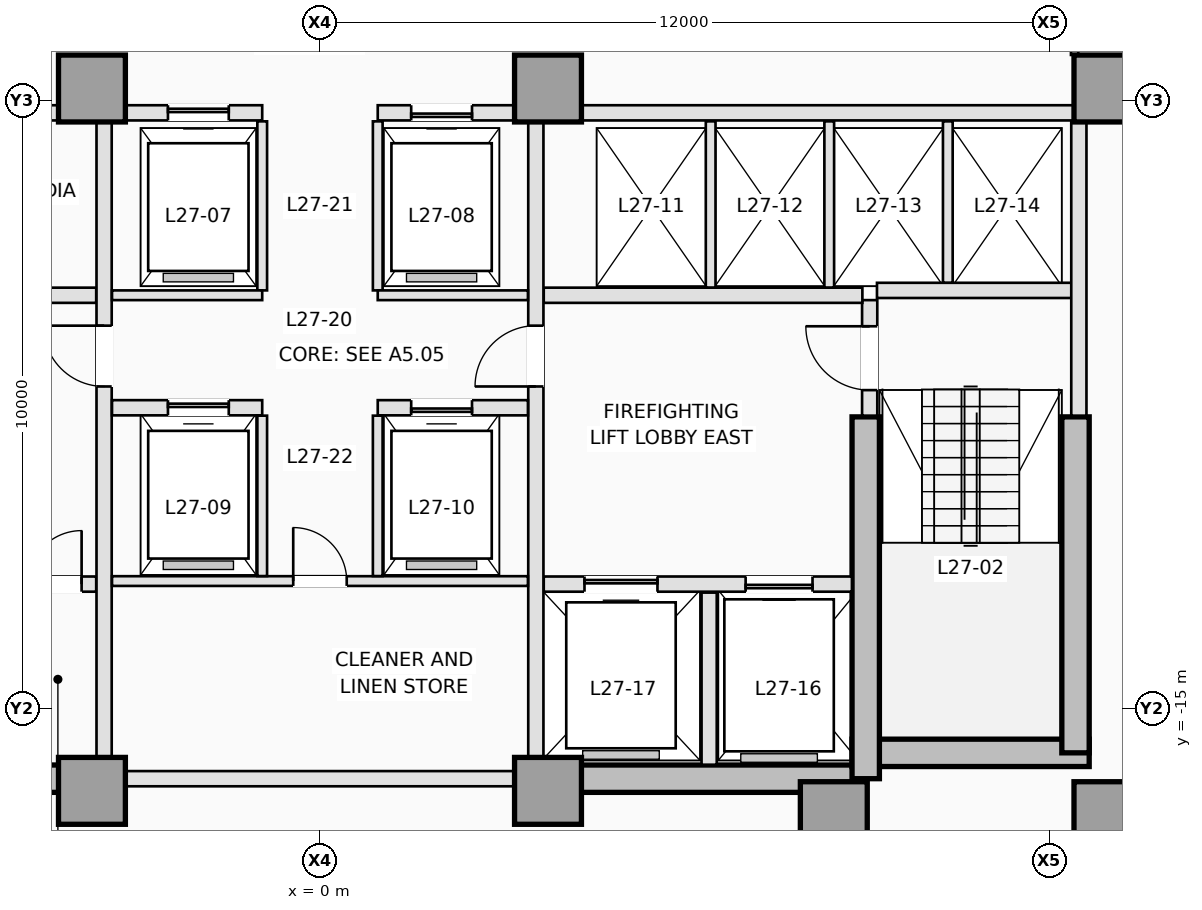
"""IFC4 building model, lengths in metres.
Left out: names, types, materials, properties, quantities, classifications, styles, units other than length and angle.
Written with IfcOpenShell. Run it as: python <this file> out.ifc"""

import sys

from ifc_helpers import new_model, si_unit, direction, frame, frame_2d, origin, origin_2d, place, context, subcontext, project, spatial, rectangle, extrude, element, fill, save


model = new_model("IFC4")
c1 = context("Model", 3, precision=1e-05, world=origin(), true_north=direction((0.0, 1.0)))
c2 = subcontext(c1, "Body", "Model", "MODEL_VIEW")
j1 = project(units=[si_unit("LENGTHUNIT", "METRE"), si_unit("PLANEANGLEUNIT", "RADIAN")], contexts=[c1])
p1 = place(None, origin())
s1 = spatial("IfcSite", under=j1, at=p1, CompositionType="ELEMENT")
p2 = place(p1, origin())
s2 = spatial("IfcBuilding", under=s1, at=p2, CompositionType="ELEMENT")
p3 = place(p2, frame((0.0, 0.0, 102.0)))
s3 = spatial("IfcBuildingStorey", under=s2, at=p3, CompositionType="ELEMENT", Elevation=102.0)
for number, where, z_axis, x_axis in (
    (1, (-8.975, -16.15, 0.0), (0.0, 0.0, 1.0), (1.0, 0.0, 0.0)),
    (2, (3.75, -16.15, 0.0), (0.0, 0.0, 1.0), (1.0, 0.0, 0.0)),
):
    element("IfcWall", number, at=place(p3, frame(where, z_axis=z_axis, x_axis=x_axis)), inside=s3, PredefinedType="SHEAR", context=c2, shape_type="SweptSolid", body=[
        extrude(rectangle(XDim=5.225, YDim=0.45, at=frame_2d((2.613, 0.0))), origin(), (0.0, 0.0, 1.0), 3.5),
    ])
p4 = place(p3, frame((8.75, -15.725, 0.0), z_axis=(0.0, 0.0, 1.0), x_axis=(1.0, 0.0, 0.0)))
e3 = element("IfcWall", 3, at=p4, inside=s3, PredefinedType="SHEAR", context=c2, shape_type="SweptSolid", body=[
    extrude(rectangle(XDim=3.9, YDim=0.45, at=frame_2d((1.95, 0.0))), origin(), (0.0, 0.0, 1.0), 3.5),
])
p5 = place(p3, frame((12.425, -15.725, 0.0), z_axis=(0.0, 0.0, 1.0), x_axis=(0.0, 1.0, 0.0)))
e4 = element("IfcWall", 4, at=p5, inside=s3, PredefinedType="SHEAR", context=c2, shape_type="SweptSolid", body=[
    extrude(rectangle(XDim=5.525, YDim=0.45, at=frame_2d((2.763, 0.0))), origin(), (0.0, 0.0, 1.0), 3.5),
])
p6 = place(p3, frame((8.975, -16.15, 0.0), z_axis=(0.0, 0.0, 1.0), x_axis=(0.0, 1.0, 0.0)))
e5 = element("IfcWall", 5, at=p6, inside=s3, PredefinedType="SHEAR", context=c2, shape_type="SweptSolid", body=[
    extrude(rectangle(XDim=5.95, YDim=0.45, at=frame_2d((2.975, 0.0))), origin(), (0.0, 0.0, 1.0), 3.5),
])
for number, where, z_axis, x_axis in (
    (6, (-3.75, -16.35, 0.0), (0.0, 0.0, 1.0), (1.0, 0.0, 0.0)),
    (7, (3.75, -16.35, 0.0), (0.0, 0.0, 1.0), (1.0, 0.0, 0.0)),
    (8, (8.45, -16.75, 0.0), (0.0, 0.0, 1.0), (1.0, 0.0, 0.0)),
    (9, (12.95, -16.75, 0.0), (0.0, 0.0, 1.0), (1.0, 0.0, 0.0)),
    (10, (-3.75, -4.8, 0.0), (0.0, 0.0, 1.0), (1.0, 0.0, 0.0)),
    (11, (3.75, -4.8, 0.0), (0.0, 0.0, 1.0), (1.0, 0.0, 0.0)),
    (12, (12.95, -4.8, 0.0), (0.0, 0.0, 1.0), (1.0, 0.0, 0.0)),
):
    element("IfcColumn", number, at=place(p3, frame(where, z_axis=z_axis, x_axis=x_axis)), inside=s3, PredefinedType="COLUMN", context=c2, shape_type="SweptSolid", body=[
        extrude(rectangle(XDim=1.1, YDim=1.1, at=origin_2d()), origin(), (0.0, 0.0, 1.0), 3.5),
    ])
p7 = place(p3, frame((9.04, -10.18, 0.0), z_axis=(0.0, 0.0, 1.0), x_axis=(0.0, 1.0, 0.0)))
e13 = element("IfcWall", 13, at=p7, inside=s3, PredefinedType="PARTITIONING", context=c2, shape_type="SweptSolid", body=[
    extrude(rectangle(XDim=1.9, YDim=0.25, at=frame_2d((0.95, 0.0))), origin(), (0.0, 0.0, 1.0), 3.25),
])
p8 = place(p7, frame((0.42, 0.0, 0.0)))
e14 = element("IfcOpeningElement", 14, at=p8, cuts=e13, PredefinedType="OPENING", context=c2, shape_type="SweptSolid", body=[
    extrude(rectangle(XDim=1.05, YDim=2.15, at=frame_2d((0.525, 1.075))), frame((0.0, 0.135, 0.0), z_axis=(0.0, -1.0, 0.0), x_axis=(1.0, 0.0, 0.0)), (0.0, 0.0, 1.0), 0.27),
])
p9 = place(p3, frame((9.16, -8.12, 0.0), z_axis=(0.0, 0.0, 1.0), x_axis=(1.0, 0.0, 0.0)))
e15 = element("IfcWall", 15, at=p9, inside=s3, PredefinedType="PARTITIONING", context=c2, shape_type="SweptSolid", body=[
    extrude(rectangle(XDim=3.22, YDim=0.25, at=frame_2d((1.61, 0.0))), origin(), (0.0, 0.0, 1.0), 3.25),
])
p10 = place(p3, frame((12.48, -10.18, 0.0), z_axis=(0.0, 0.0, 1.0), x_axis=(0.0, 1.0, 0.0)))
e16 = element("IfcWall", 16, at=p10, inside=s3, PredefinedType="PARTITIONING", context=c2, shape_type="SweptSolid", body=[
    extrude(rectangle(XDim=4.828, YDim=0.25, at=frame_2d((2.414, 0.0))), origin(), (0.0, 0.0, 1.0), 3.25),
])
p11 = place(p3, frame((-8.748, -12.95, 0.0), z_axis=(0.0, 0.0, 1.0), x_axis=(1.0, 0.0, 0.0)))
e17 = element("IfcWall", 17, at=p11, inside=s3, PredefinedType="PARTITIONING", context=c2, shape_type="SweptSolid", body=[
    extrude(rectangle(XDim=5.068, YDim=0.25, at=frame_2d((2.534, 0.0))), origin(), (0.0, 0.0, 1.0), 3.25),
])
p12 = place(p11, frame((0.648, 0.0, 0.0)))
e18 = element("IfcOpeningElement", 18, at=p12, cuts=e17, PredefinedType="OPENING", context=c2, shape_type="SweptSolid", body=[
    extrude(rectangle(XDim=1.1, YDim=2.15, at=frame_2d((0.55, 1.075))), frame((0.0, 0.135, 0.0), z_axis=(0.0, -1.0, 0.0), x_axis=(1.0, 0.0, 0.0)), (0.0, 0.0, 1.0), 0.27),
])
p13 = place(p11, frame((2.548, 0.0, 0.0)))
e19 = element("IfcOpeningElement", 19, at=p13, cuts=e17, PredefinedType="OPENING", context=c2, shape_type="SweptSolid", body=[
    extrude(rectangle(XDim=0.88, YDim=2.1, at=frame_2d((0.44, 1.05))), frame((0.0, 0.135, 0.0), z_axis=(0.0, -1.0, 0.0), x_axis=(1.0, 0.0, 0.0)), (0.0, 0.0, 1.0), 0.27),
])
p14 = place(p11, frame((3.948, 0.0, 0.0)))
e20 = element("IfcOpeningElement", 20, at=p14, cuts=e17, PredefinedType="OPENING", context=c2, shape_type="SweptSolid", body=[
    extrude(rectangle(XDim=0.88, YDim=2.1, at=frame_2d((0.44, 1.05))), frame((0.0, 0.135, 0.0), z_axis=(0.0, -1.0, 0.0), x_axis=(1.0, 0.0, 0.0)), (0.0, 0.0, 1.0), 0.27),
])
p15 = place(p3, frame((3.68, -12.95, 0.0), z_axis=(0.0, 0.0, 1.0), x_axis=(1.0, 0.0, 0.0)))
e21 = element("IfcWall", 21, at=p15, inside=s3, PredefinedType="PARTITIONING", context=c2, shape_type="SweptSolid", body=[
    extrude(rectangle(XDim=5.068, YDim=0.25, at=frame_2d((2.534, 0.0))), origin(), (0.0, 0.0, 1.0), 3.25),
])
p16 = place(p15, frame((3.32, 0.0, 0.0)))
e22 = element("IfcOpeningElement", 22, at=p16, cuts=e21, PredefinedType="OPENING", context=c2, shape_type="SweptSolid", body=[
    extrude(rectangle(XDim=1.1, YDim=2.15, at=frame_2d((0.55, 1.075))), frame((0.0, 0.135, 0.0), z_axis=(0.0, -1.0, 0.0), x_axis=(1.0, 0.0, 0.0)), (0.0, 0.0, 1.0), 0.27),
])
p17 = place(p15, frame((0.67, 0.0, 0.0)))
e23 = element("IfcOpeningElement", 23, at=p17, cuts=e21, PredefinedType="OPENING", context=c2, shape_type="SweptSolid", body=[
    extrude(rectangle(XDim=1.2, YDim=2.15, at=frame_2d((0.6, 1.075))), frame((0.0, 0.135, 0.0), z_axis=(0.0, -1.0, 0.0), x_axis=(1.0, 0.0, 0.0)), (0.0, 0.0, 1.0), 0.27),
])
p18 = place(p3, frame((6.4, -15.92, 0.0), z_axis=(0.0, 0.0, 1.0), x_axis=(0.0, 1.0, 0.0)))
e24 = element("IfcWall", 24, at=p18, inside=s3, PredefinedType="PARTITIONING", context=c2, shape_type="SweptSolid", body=[
    extrude(rectangle(XDim=2.83, YDim=0.25, at=frame_2d((1.415, 0.0))), origin(), (0.0, 0.0, 1.0), 3.25),
])
for number, where, z_axis, x_axis in (
    (25, (-8.92, -8.2, 0.0), (0.0, 0.0, 1.0), (1.0, 0.0, 0.0)),
    (26, (3.68, -8.2, 0.0), (0.0, 0.0, 1.0), (1.0, 0.0, 0.0)),
):
    element("IfcWall", number, at=place(p3, frame(where, z_axis=z_axis, x_axis=x_axis)), inside=s3, PredefinedType="PARTITIONING", context=c2, shape_type="SweptSolid", body=[
        extrude(rectangle(XDim=5.24, YDim=0.25, at=frame_2d((2.62, 0.0))), origin(), (0.0, 0.0, 1.0), 3.25),
    ])
p19 = place(p3, frame((-3.55, -15.798, 0.0), z_axis=(0.0, 0.0, 1.0), x_axis=(0.0, 1.0, 0.0)))
e27 = element("IfcWall", 27, at=p19, inside=s3, PredefinedType="PARTITIONING", context=c2, shape_type="SweptSolid", body=[
    extrude(rectangle(XDim=10.446, YDim=0.25, at=frame_2d((5.223, 0.0))), origin(), (0.0, 0.0, 1.0), 3.25),
])
p20 = place(p19, frame((6.098, 0.0, 0.0)))
e28 = element("IfcOpeningElement", 28, at=p20, cuts=e27, PredefinedType="OPENING", context=c2, shape_type="SweptSolid", body=[
    extrude(rectangle(XDim=1.0, YDim=2.15, at=frame_2d((0.5, 1.075))), frame((0.0, 0.135, 0.0), z_axis=(0.0, -1.0, 0.0), x_axis=(1.0, 0.0, 0.0)), (0.0, 0.0, 1.0), 0.27),
])
p21 = place(p3, frame((3.55, -15.798, 0.0), z_axis=(0.0, 0.0, 1.0), x_axis=(0.0, 1.0, 0.0)))
e29 = element("IfcWall", 29, at=p21, inside=s3, PredefinedType="PARTITIONING", context=c2, shape_type="SweptSolid", body=[
    extrude(rectangle(XDim=10.446, YDim=0.25, at=frame_2d((5.223, 0.0))), origin(), (0.0, 0.0, 1.0), 3.25),
])
p22 = place(p21, frame((6.098, 0.0, 0.0)))
e30 = element("IfcOpeningElement", 30, at=p22, cuts=e29, PredefinedType="OPENING", context=c2, shape_type="SweptSolid", body=[
    extrude(rectangle(XDim=1.0, YDim=2.15, at=frame_2d((0.5, 1.075))), frame((0.0, 0.135, 0.0), z_axis=(0.0, -1.0, 0.0), x_axis=(1.0, 0.0, 0.0)), (0.0, 0.0, 1.0), 0.27),
])
p23 = place(p3, frame((-12.398, -5.2, 0.0), z_axis=(0.0, 0.0, 1.0), x_axis=(1.0, 0.0, 0.0)))
e31 = element("IfcWall", 31, at=p23, inside=s3, PredefinedType="PARTITIONING", context=c2, shape_type="SweptSolid", body=[
    extrude(rectangle(XDim=8.096, YDim=0.25, at=frame_2d((4.048, 0.0))), origin(), (0.0, 0.0, 1.0), 3.25),
])
p24 = place(p23, frame((2.968, 0.0, 0.0)))
e32 = element("IfcOpeningElement", 32, at=p24, cuts=e31, PredefinedType="OPENING", context=c2, shape_type="SweptSolid", body=[
    extrude(rectangle(XDim=0.92, YDim=2.12, at=frame_2d((0.46, 1.06))), frame((0.0, 0.135, 0.0), z_axis=(0.0, -1.0, 0.0), x_axis=(1.0, 0.0, 0.0)), (0.0, 0.0, 1.0), 0.27),
])
p25 = place(p23, frame((6.068, 0.0, 0.0)))
e33 = element("IfcOpeningElement", 33, at=p25, cuts=e31, PredefinedType="OPENING", context=c2, shape_type="SweptSolid", body=[
    extrude(rectangle(XDim=0.92, YDim=2.12, at=frame_2d((0.46, 1.06))), frame((0.0, 0.135, 0.0), z_axis=(0.0, -1.0, 0.0), x_axis=(1.0, 0.0, 0.0)), (0.0, 0.0, 1.0), 0.27),
])
p26 = place(p3, frame((4.302, -5.2, 0.0), z_axis=(0.0, 0.0, 1.0), x_axis=(1.0, 0.0, 0.0)))
e34 = element("IfcWall", 34, at=p26, inside=s3, PredefinedType="PARTITIONING", context=c2, shape_type="SweptSolid", body=[
    extrude(rectangle(XDim=8.096, YDim=0.25, at=frame_2d((4.048, 0.0))), origin(), (0.0, 0.0, 1.0), 3.25),
])
p27 = place(p3, frame((-3.198, -5.2, 0.0), z_axis=(0.0, 0.0, 1.0), x_axis=(1.0, 0.0, 0.0)))
e35 = element("IfcWall", 35, at=p27, inside=s3, PredefinedType="PARTITIONING", context=c2, shape_type="SweptSolid", body=[
    extrude(rectangle(XDim=2.248, YDim=0.25, at=frame_2d((1.124, 0.0))), origin(), (0.0, 0.0, 1.0), 3.25),
])
p28 = place(p27, frame((0.698, 0.0, 0.0)))
e36 = element("IfcOpeningElement", 36, at=p28, cuts=e35, PredefinedType="OPENING", context=c2, shape_type="SweptSolid", body=[
    extrude(rectangle(XDim=1.0, YDim=2.15, at=frame_2d((0.5, 1.075))), frame((0.0, 0.135, 0.0), z_axis=(0.0, -1.0, 0.0), x_axis=(1.0, 0.0, 0.0)), (0.0, 0.0, 1.0), 0.27),
])
p29 = place(p3, frame((0.95, -5.2, 0.0), z_axis=(0.0, 0.0, 1.0), x_axis=(1.0, 0.0, 0.0)))
e37 = element("IfcWall", 37, at=p29, inside=s3, PredefinedType="PARTITIONING", context=c2, shape_type="SweptSolid", body=[
    extrude(rectangle(XDim=2.248, YDim=0.25, at=frame_2d((1.124, 0.0))), origin(), (0.0, 0.0, 1.0), 3.25),
])
p30 = place(p29, frame((0.55, 0.0, 0.0)))
e38 = element("IfcOpeningElement", 38, at=p30, cuts=e37, PredefinedType="OPENING", context=c2, shape_type="SweptSolid", body=[
    extrude(rectangle(XDim=1.0, YDim=2.15, at=frame_2d((0.5, 1.075))), frame((0.0, 0.135, 0.0), z_axis=(0.0, -1.0, 0.0), x_axis=(1.0, 0.0, 0.0)), (0.0, 0.0, 1.0), 0.27),
])
for number, where, z_axis, x_axis in (
    (39, (6.425, -8.073, 0.0), (0.0, 0.0, 1.0), (0.0, 1.0, 0.0)),
    (40, (8.375, -8.073, 0.0), (0.0, 0.0, 1.0), (0.0, 1.0, 0.0)),
):
    element("IfcWall", number, at=place(p3, frame(where, z_axis=z_axis, x_axis=x_axis)), inside=s3, PredefinedType="PARTITIONING", context=c2, shape_type="SweptSolid", body=[
        extrude(rectangle(XDim=2.733, YDim=0.16, at=frame_2d((1.366, 0.0))), origin(), (0.0, 0.0, 1.0), 3.25),
    ])
p31 = place(p3, frame((10.325, -7.993, 0.0), z_axis=(0.0, 0.0, 1.0), x_axis=(0.0, 1.0, 0.0)))
e41 = element("IfcWall", 41, at=p31, inside=s3, PredefinedType="PARTITIONING", context=c2, shape_type="SweptSolid", body=[
    extrude(rectangle(XDim=2.653, YDim=0.16, at=frame_2d((1.326, 0.0))), origin(), (0.0, 0.0, 1.0), 3.25),
])
p32 = place(p3, frame((-3.198, -16.15, 0.0), z_axis=(0.0, 0.0, 1.0), x_axis=(1.0, 0.0, 0.0)))
e42 = element("IfcWall", 42, at=p32, inside=s3, PredefinedType="PARTITIONING", context=c2, shape_type="SweptSolid", body=[
    extrude(rectangle(XDim=6.396, YDim=0.25, at=frame_2d((3.198, 0.0))), origin(), (0.0, 0.0, 1.0), 2.3),
])
for number, where, z_axis, x_axis in (
    (43, (-0.95, -8.12, 0.0), (0.0, 0.0, 1.0), (0.0, 1.0, 0.0)),
    (44, (0.95, -8.12, 0.0), (0.0, 0.0, 1.0), (0.0, 1.0, 0.0)),
):
    element("IfcWall", number, at=place(p3, frame(where, z_axis=z_axis, x_axis=x_axis)), inside=s3, PredefinedType="PARTITIONING", context=c2, shape_type="SweptSolid", body=[
        extrude(rectangle(XDim=2.78, YDim=0.16, at=frame_2d((1.39, 0.0))), origin(), (0.0, 0.0, 1.0), 3.25),
    ])
for number, where, z_axis, x_axis in (
    (45, (-3.42, -8.2, 0.0), (0.0, 0.0, 1.0), (1.0, 0.0, 0.0)),
    (46, (0.95, -8.2, 0.0), (0.0, 0.0, 1.0), (1.0, 0.0, 0.0)),
):
    element("IfcWall", number, at=place(p3, frame(where, z_axis=z_axis, x_axis=x_axis)), inside=s3, PredefinedType="PARTITIONING", context=c2, shape_type="SweptSolid", body=[
        extrude(rectangle(XDim=2.47, YDim=0.16, at=frame_2d((1.235, 0.0))), origin(), (0.0, 0.0, 1.0), 3.25),
    ])
p33 = place(p3, frame((-3.42, -10.05, 0.0), z_axis=(0.0, 0.0, 1.0), x_axis=(1.0, 0.0, 0.0)))
e47 = element("IfcWall", 47, at=p33, inside=s3, PredefinedType="PARTITIONING", context=c2, shape_type="SweptSolid", body=[
    extrude(rectangle(XDim=2.47, YDim=0.25, at=frame_2d((1.235, 0.0))), origin(), (0.0, 0.0, 1.0), 3.25),
])
p34 = place(p33, frame((0.92, 0.0, 0.0)))
e48 = element("IfcOpeningElement", 48, at=p34, cuts=e47, PredefinedType="OPENING", context=c2, shape_type="SweptSolid", body=[
    extrude(rectangle(XDim=1.0, YDim=2.15, at=frame_2d((0.5, 1.075))), frame((0.0, 0.135, 0.0), z_axis=(0.0, -1.0, 0.0), x_axis=(1.0, 0.0, 0.0)), (0.0, 0.0, 1.0), 0.27),
])
p35 = place(p3, frame((0.95, -10.05, 0.0), z_axis=(0.0, 0.0, 1.0), x_axis=(1.0, 0.0, 0.0)))
e49 = element("IfcWall", 49, at=p35, inside=s3, PredefinedType="PARTITIONING", context=c2, shape_type="SweptSolid", body=[
    extrude(rectangle(XDim=2.47, YDim=0.25, at=frame_2d((1.235, 0.0))), origin(), (0.0, 0.0, 1.0), 3.25),
])
p36 = place(p35, frame((0.55, 0.0, 0.0)))
e50 = element("IfcOpeningElement", 50, at=p36, cuts=e49, PredefinedType="OPENING", context=c2, shape_type="SweptSolid", body=[
    extrude(rectangle(XDim=1.0, YDim=2.15, at=frame_2d((0.5, 1.075))), frame((0.0, 0.135, 0.0), z_axis=(0.0, -1.0, 0.0), x_axis=(1.0, 0.0, 0.0)), (0.0, 0.0, 1.0), 0.27),
])
p37 = place(p3, frame((-3.42, -12.9, 0.0), z_axis=(0.0, 0.0, 1.0), x_axis=(1.0, 0.0, 0.0)))
e51 = element("IfcWall", 51, at=p37, inside=s3, PredefinedType="PARTITIONING", context=c2, shape_type="SweptSolid", body=[
    extrude(rectangle(XDim=6.84, YDim=0.16, at=frame_2d((3.42, 0.0))), origin(), (0.0, 0.0, 1.0), 3.25),
])
p38 = place(p37, frame((2.98, 0.0, 0.0)))
e52 = element("IfcOpeningElement", 52, at=p38, cuts=e51, PredefinedType="OPENING", context=c2, shape_type="SweptSolid", body=[
    extrude(rectangle(XDim=0.88, YDim=2.12, at=frame_2d((0.44, 1.06))), frame((0.0, 0.09, 0.0), z_axis=(0.0, -1.0, 0.0), x_axis=(1.0, 0.0, 0.0)), (0.0, 0.0, 1.0), 0.18),
])
for number, where, z_axis, x_axis in (
    (53, (-0.95, -12.818, 0.0), (0.0, 0.0, 1.0), (0.0, 1.0, 0.0)),
    (54, (0.95, -12.818, 0.0), (0.0, 0.0, 1.0), (0.0, 1.0, 0.0)),
):
    element("IfcWall", number, at=place(p3, frame(where, z_axis=z_axis, x_axis=x_axis)), inside=s3, PredefinedType="PARTITIONING", context=c2, shape_type="SweptSolid", body=[
        extrude(rectangle(XDim=2.638, YDim=0.16, at=frame_2d((1.319, 0.0))), origin(), (0.0, 0.0, 1.0), 3.25),
    ])
p39 = place(p3, frame((12.41, -2.462, 0.0), z_axis=(0.0, 0.0, 1.0), x_axis=(0.0, -1.0, 0.0)))
e55 = element("IfcWall", 55, at=p39, inside=s3, PredefinedType="PARTITIONING", context=c2, shape_type="SweptSolid", body=[
    extrude(rectangle(XDim=1.786, YDim=0.12, at=frame_2d((0.893, 0.0))), origin(), (0.0, 0.0, 1.0), 3.25),
])
p40 = place(p39, frame((0.623, 0.0, 0.0)))
e56 = element("IfcOpeningElement", 56, at=p40, cuts=e55, PredefinedType="OPENING", context=c2, shape_type="SweptSolid", body=[
    extrude(rectangle(XDim=0.92, YDim=2.12, at=frame_2d((0.46, 1.06))), frame((0.0, 0.07, 0.0), z_axis=(0.0, -1.0, 0.0), x_axis=(1.0, 0.0, 0.0)), (0.0, 0.0, 1.0), 0.14),
])
p41 = place(p28, origin())
e57 = element("IfcDoor", 57, at=p41, inside=s3, OperationType="SLIDING_TO_LEFT", PredefinedType="DOOR", context=c2, shape_type="SweptSolid", body=[
    extrude(rectangle(XDim=1.0, YDim=2.15, at=frame_2d((0.5, 1.075))), frame((0.0, 0.025, 0.0), z_axis=(0.0, -1.0, 0.0), x_axis=(1.0, 0.0, 0.0)), (0.0, 0.0, 1.0), 0.05),
])
fill(e36, e57)
p42 = place(p30, origin())
e58 = element("IfcDoor", 58, at=p42, inside=s3, OperationType="SLIDING_TO_RIGHT", PredefinedType="DOOR", context=c2, shape_type="SweptSolid", body=[
    extrude(rectangle(XDim=1.0, YDim=2.15, at=frame_2d((0.5, 1.075))), frame((0.0, 0.025, 0.0), z_axis=(0.0, -1.0, 0.0), x_axis=(1.0, 0.0, 0.0)), (0.0, 0.0, 1.0), 0.05),
])
fill(e38, e58)
p43 = place(p16, origin())
e59 = element("IfcDoor", 59, at=p43, inside=s3, OperationType="SLIDING_TO_RIGHT", PredefinedType="DOOR", context=c2, shape_type="SweptSolid", body=[
    extrude(rectangle(XDim=1.1, YDim=2.15, at=frame_2d((0.55, 1.075))), frame((0.0, 0.025, 0.0), z_axis=(0.0, -1.0, 0.0), x_axis=(1.0, 0.0, 0.0)), (0.0, 0.0, 1.0), 0.05),
])
fill(e22, e59)
p44 = place(p17, origin())
e60 = element("IfcDoor", 60, at=p44, inside=s3, OperationType="SLIDING_TO_LEFT", PredefinedType="DOOR", context=c2, shape_type="SweptSolid", body=[
    extrude(rectangle(XDim=1.2, YDim=2.15, at=frame_2d((0.6, 1.075))), frame((0.0, 0.025, 0.0), z_axis=(0.0, -1.0, 0.0), x_axis=(1.0, 0.0, 0.0)), (0.0, 0.0, 1.0), 0.05),
])
fill(e23, e60)
p45 = place(p34, origin())
e61 = element("IfcDoor", 61, at=p45, inside=s3, OperationType="SLIDING_TO_LEFT", PredefinedType="DOOR", context=c2, shape_type="SweptSolid", body=[
    extrude(rectangle(XDim=1.0, YDim=2.15, at=frame_2d((0.5, 1.075))), frame((0.0, 0.025, 0.0), z_axis=(0.0, -1.0, 0.0), x_axis=(1.0, 0.0, 0.0)), (0.0, 0.0, 1.0), 0.05),
])
fill(e48, e61)
p46 = place(p36, origin())
e62 = element("IfcDoor", 62, at=p46, inside=s3, OperationType="SLIDING_TO_RIGHT", PredefinedType="DOOR", context=c2, shape_type="SweptSolid", body=[
    extrude(rectangle(XDim=1.0, YDim=2.15, at=frame_2d((0.5, 1.075))), frame((0.0, 0.025, 0.0), z_axis=(0.0, -1.0, 0.0), x_axis=(1.0, 0.0, 0.0)), (0.0, 0.0, 1.0), 0.05),
])
fill(e50, e62)
p47 = place(p8, origin())
e63 = element("IfcDoor", 63, at=p47, inside=s3, OperationType="SINGLE_SWING_RIGHT", PredefinedType="DOOR", context=c2, shape_type="SweptSolid", body=[
    extrude(rectangle(XDim=1.05, YDim=2.15, at=frame_2d((0.525, 1.075))), frame((0.0, 0.025, 0.0), z_axis=(0.0, -1.0, 0.0), x_axis=(1.0, 0.0, 0.0)), (0.0, 0.0, 1.0), 0.05),
])
fill(e14, e63)
p48 = place(p14, origin())
e64 = element("IfcDoor", 64, at=p48, inside=s3, OperationType="SINGLE_SWING_RIGHT", PredefinedType="TRAPDOOR", context=c2, shape_type="SweptSolid", body=[
    extrude(rectangle(XDim=0.88, YDim=2.1, at=frame_2d((0.44, 1.05))), frame((0.0, 0.025, 0.0), z_axis=(0.0, -1.0, 0.0), x_axis=(1.0, 0.0, 0.0)), (0.0, 0.0, 1.0), 0.05),
])
fill(e20, e64)
p49 = place(p20, origin())
e65 = element("IfcDoor", 65, at=p49, inside=s3, OperationType="SINGLE_SWING_RIGHT", PredefinedType="DOOR", context=c2, shape_type="SweptSolid", body=[
    extrude(rectangle(XDim=1.0, YDim=2.15, at=frame_2d((0.5, 1.075))), frame((0.0, 0.025, 0.0), z_axis=(0.0, -1.0, 0.0), x_axis=(1.0, 0.0, 0.0)), (0.0, 0.0, 1.0), 0.05),
])
fill(e28, e65)
p50 = place(p22, origin())
e66 = element("IfcDoor", 66, at=p50, inside=s3, OperationType="SINGLE_SWING_LEFT", PredefinedType="DOOR", context=c2, shape_type="SweptSolid", body=[
    extrude(rectangle(XDim=1.0, YDim=2.15, at=frame_2d((0.5, 1.075))), frame((0.0, 0.025, 0.0), z_axis=(0.0, -1.0, 0.0), x_axis=(1.0, 0.0, 0.0)), (0.0, 0.0, 1.0), 0.05),
])
fill(e30, e66)
p51 = place(p38, origin())
e67 = element("IfcDoor", 67, at=p51, inside=s3, OperationType="SINGLE_SWING_LEFT", PredefinedType="DOOR", context=c2, shape_type="SweptSolid", body=[
    extrude(rectangle(XDim=0.88, YDim=2.12, at=frame_2d((0.44, 1.06))), frame((0.0, 0.025, 0.0), z_axis=(0.0, -1.0, 0.0), x_axis=(1.0, 0.0, 0.0)), (0.0, 0.0, 1.0), 0.05),
])
fill(e52, e67)
save(model, sys.argv[1])
